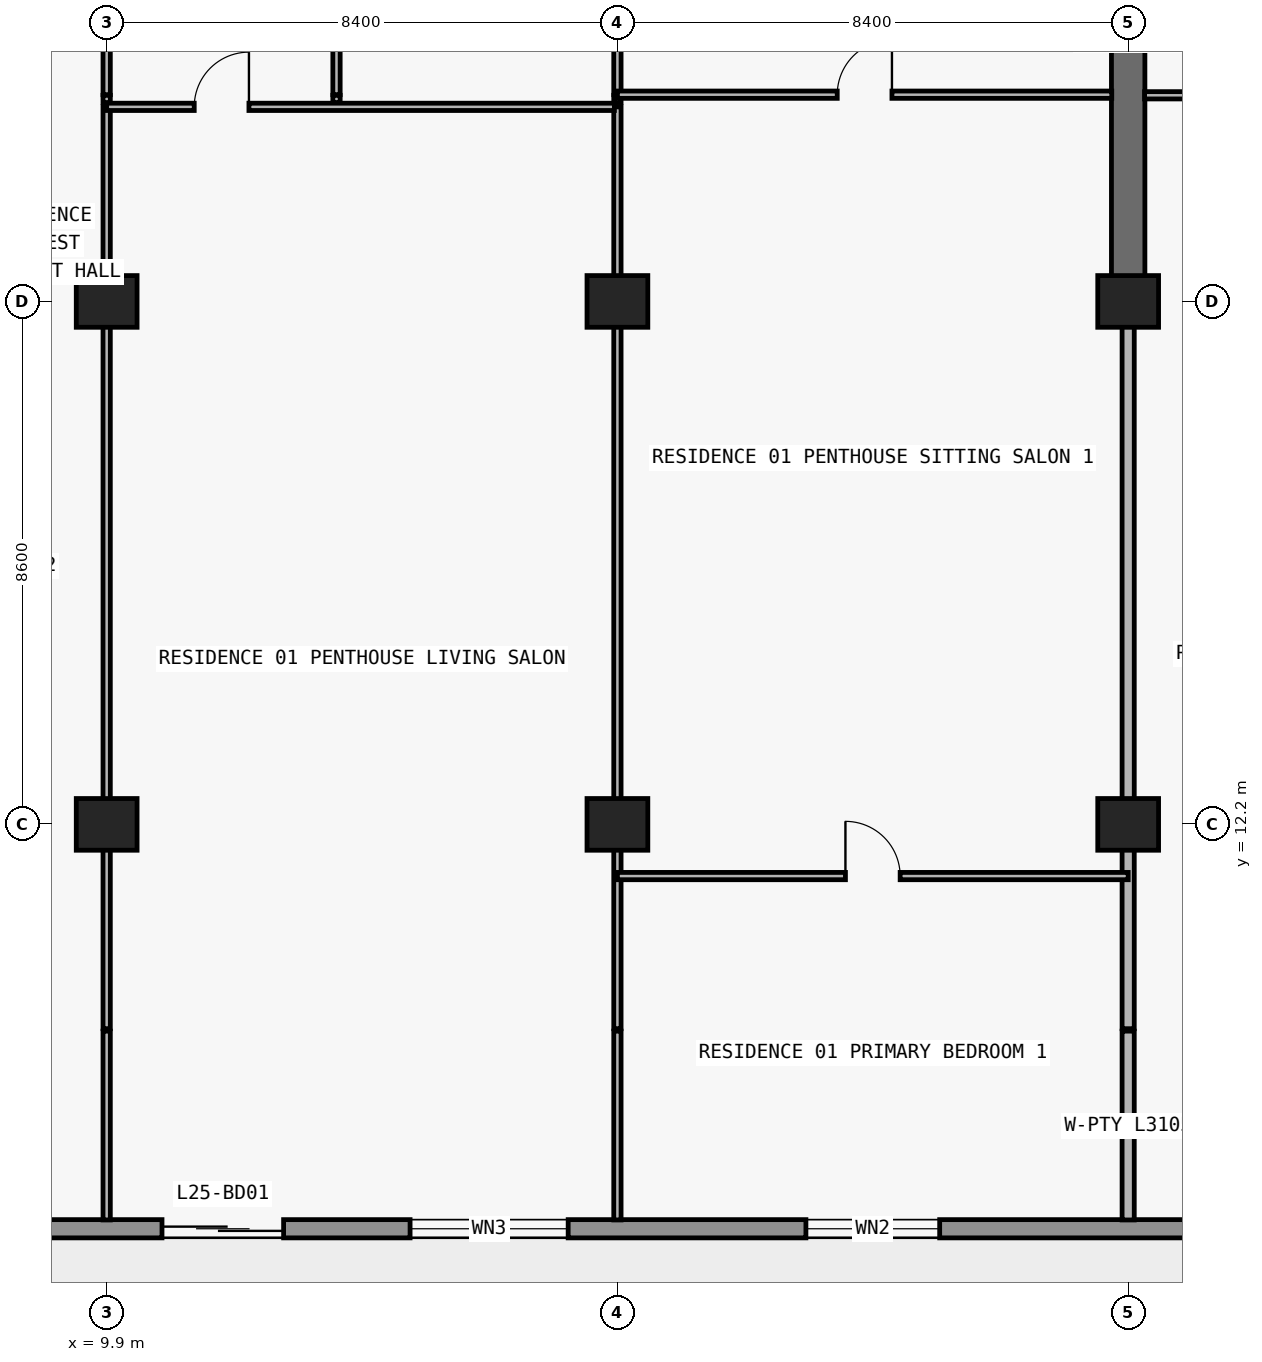
"""IFC4 building model, lengths in metres.
Left out: names, types, materials, properties, quantities, classifications, styles, units other than length and angle.
Written with IfcOpenShell. Run it as: python <this file> out.ifc"""

import sys

from ifc_helpers import new_model, si_unit, direction, frame, frame_2d, origin, origin_2d, place, context, subcontext, project, spatial, rectangle, extrude, element, fill, save


model = new_model("IFC4")
c1 = context("Model", 3, precision=1e-05, world=origin(), true_north=direction((0.0, 1.0)))
c2 = subcontext(c1, "Body", "Model", "MODEL_VIEW")
j1 = project(units=[si_unit("LENGTHUNIT", "METRE"), si_unit("PLANEANGLEUNIT", "RADIAN")], contexts=[c1])
p1 = place(None, origin())
s1 = spatial("IfcSite", under=j1, at=p1, CompositionType="ELEMENT")
p2 = place(p1, origin())
s2 = spatial("IfcBuilding", under=s1, at=p2, CompositionType="ELEMENT")
p3 = place(p2, frame((0.0, 0.0, 94.5)))
s3 = spatial("IfcBuildingStorey", under=s2, at=p3, CompositionType="ELEMENT", Elevation=94.5)
for number, where, z_axis, x_axis in (
    (1, (9.9, 12.2, 0.0), (0.0, 0.0, 1.0), (1.0, 0.0, 0.0)),
    (2, (18.3, 12.2, 0.0), (0.0, 0.0, 1.0), (1.0, 0.0, 0.0)),
    (3, (26.7, 12.2, 0.0), (0.0, 0.0, 1.0), (1.0, 0.0, 0.0)),
    (4, (9.9, 20.8, 0.0), (0.0, 0.0, 1.0), (1.0, 0.0, 0.0)),
    (5, (18.3, 20.8, 0.0), (0.0, 0.0, 1.0), (1.0, 0.0, 0.0)),
    (6, (26.7, 20.8, 0.0), (0.0, 0.0, 1.0), (1.0, 0.0, 0.0)),
):
    element("IfcColumn", number, at=place(p3, frame(where, z_axis=z_axis, x_axis=x_axis)), inside=s3, PredefinedType="COLUMN", context=c2, shape_type="SweptSolid", body=[
        extrude(rectangle(XDim=1.0, YDim=0.85, at=origin_2d()), origin(), (0.0, 0.0, 1.0), 3.0),
    ])
p4 = place(p3, frame((26.7, 20.8, 0.0), z_axis=(0.0, 0.0, 1.0), x_axis=(0.0, 1.0, 0.0)))
e7 = element("IfcWall", 7, at=p4, inside=s3, PredefinedType="SHEAR", context=c2, shape_type="SweptSolid", body=[
    extrude(rectangle(XDim=8.6, YDim=0.55, at=frame_2d((4.3, 0.0))), origin(), (0.0, 0.0, 1.0), 3.0),
])
p5 = place(p3, frame((70.1, 5.55, 0.0), z_axis=(0.0, 0.0, 1.0), x_axis=(-1.0, 0.0, 0.0)))
e8 = element("IfcWall", 8, at=p5, inside=s3, PredefinedType="STANDARD", context=c2, shape_type="SweptSolid", body=[
    extrude(rectangle(XDim=62.4, YDim=0.3, at=frame_2d((31.2, 0.0))), origin(), (0.0, 0.0, 1.0), 3.0),
])
p6 = place(p5, frame((57.29, 0.0, 0.0)))
e9 = element("IfcOpeningElement", 9, at=p6, cuts=e8, PredefinedType="OPENING", context=c2, shape_type="SweptSolid", body=[
    extrude(rectangle(XDim=2.0, YDim=2.3, at=frame_2d((1.0, 1.15))), frame((0.0, 0.16, 0.0), z_axis=(0.0, -1.0, 0.0), x_axis=(1.0, 0.0, 0.0)), (0.0, 0.0, 1.0), 0.32),
])
p7 = place(p5, frame((52.61, 0.0, 0.65)))
e10 = element("IfcOpeningElement", 10, at=p7, cuts=e8, PredefinedType="OPENING", context=c2, shape_type="SweptSolid", body=[
    extrude(rectangle(XDim=2.6, YDim=1.85, at=frame_2d((1.3, 0.925))), frame((0.0, 0.16, 0.0), z_axis=(0.0, -1.0, 0.0), x_axis=(1.0, 0.0, 0.0)), (0.0, 0.0, 1.0), 0.32),
])
p8 = place(p5, frame((46.5, 0.0, 0.85)))
e11 = element("IfcOpeningElement", 11, at=p8, cuts=e8, PredefinedType="OPENING", context=c2, shape_type="SweptSolid", body=[
    extrude(rectangle(XDim=2.2, YDim=1.55, at=frame_2d((1.1, 0.775))), frame((0.0, 0.16, 0.0), z_axis=(0.0, -1.0, 0.0), x_axis=(1.0, 0.0, 0.0)), (0.0, 0.0, 1.0), 0.32),
])
p9 = place(p5, frame((40.09, 0.0, 0.0)))
e12 = element("IfcOpeningElement", 12, at=p9, cuts=e8, PredefinedType="OPENING", context=c2, shape_type="SweptSolid", body=[
    extrude(rectangle(XDim=2.0, YDim=2.3, at=frame_2d((1.0, 1.15))), frame((0.0, 0.16, 0.0), z_axis=(0.0, -1.0, 0.0), x_axis=(1.0, 0.0, 0.0)), (0.0, 0.0, 1.0), 0.32),
])
p10 = place(p5, frame((35.99, 0.0, 0.85)))
e13 = element("IfcOpeningElement", 13, at=p10, cuts=e8, PredefinedType="OPENING", context=c2, shape_type="SweptSolid", body=[
    extrude(rectangle(XDim=1.8, YDim=1.55, at=frame_2d((0.9, 0.775))), frame((0.0, 0.16, 0.0), z_axis=(0.0, -1.0, 0.0), x_axis=(1.0, 0.0, 0.0)), (0.0, 0.0, 1.0), 0.32),
])
p11 = place(p5, frame((28.314, 0.0, 0.85)))
e14 = element("IfcOpeningElement", 14, at=p11, cuts=e8, PredefinedType="OPENING", context=c2, shape_type="SweptSolid", body=[
    extrude(rectangle(XDim=2.2, YDim=1.55, at=frame_2d((1.1, 0.775))), frame((0.0, 0.16, 0.0), z_axis=(0.0, -1.0, 0.0), x_axis=(1.0, 0.0, 0.0)), (0.0, 0.0, 1.0), 0.32),
])
p12 = place(p5, frame((24.09, 0.0, 0.0)))
e15 = element("IfcOpeningElement", 15, at=p12, cuts=e8, PredefinedType="OPENING", context=c2, shape_type="SweptSolid", body=[
    extrude(rectangle(XDim=2.0, YDim=2.3, at=frame_2d((1.0, 1.15))), frame((0.0, 0.16, 0.0), z_axis=(0.0, -1.0, 0.0), x_axis=(1.0, 0.0, 0.0)), (0.0, 0.0, 1.0), 0.32),
])
p13 = place(p5, frame((19.99, 0.0, 0.85)))
e16 = element("IfcOpeningElement", 16, at=p13, cuts=e8, PredefinedType="OPENING", context=c2, shape_type="SweptSolid", body=[
    extrude(rectangle(XDim=1.8, YDim=1.55, at=frame_2d((0.9, 0.775))), frame((0.0, 0.16, 0.0), z_axis=(0.0, -1.0, 0.0), x_axis=(1.0, 0.0, 0.0)), (0.0, 0.0, 1.0), 0.32),
])
p14 = place(p5, frame((16.09, 0.0, 0.0)))
e17 = element("IfcOpeningElement", 17, at=p14, cuts=e8, PredefinedType="OPENING", context=c2, shape_type="SweptSolid", body=[
    extrude(rectangle(XDim=2.0, YDim=2.3, at=frame_2d((1.0, 1.15))), frame((0.0, 0.16, 0.0), z_axis=(0.0, -1.0, 0.0), x_axis=(1.0, 0.0, 0.0)), (0.0, 0.0, 1.0), 0.32),
])
p15 = place(p5, frame((11.41, 0.0, 0.65)))
e18 = element("IfcOpeningElement", 18, at=p15, cuts=e8, PredefinedType="OPENING", context=c2, shape_type="SweptSolid", body=[
    extrude(rectangle(XDim=2.6, YDim=1.85, at=frame_2d((1.3, 0.925))), frame((0.0, 0.16, 0.0), z_axis=(0.0, -1.0, 0.0), x_axis=(1.0, 0.0, 0.0)), (0.0, 0.0, 1.0), 0.32),
])
p16 = place(p5, frame((5.3, 0.0, 0.85)))
e19 = element("IfcOpeningElement", 19, at=p16, cuts=e8, PredefinedType="OPENING", context=c2, shape_type="SweptSolid", body=[
    extrude(rectangle(XDim=2.2, YDim=1.55, at=frame_2d((1.1, 0.775))), frame((0.0, 0.16, 0.0), z_axis=(0.0, -1.0, 0.0), x_axis=(1.0, 0.0, 0.0)), (0.0, 0.0, 1.0), 0.32),
])
p17 = place(p3, frame((9.9, 5.695, 0.0), z_axis=(0.0, 0.0, 1.0), x_axis=(0.0, 1.0, 0.0)))
e20 = element("IfcWall", 20, at=p17, inside=s3, PredefinedType="PARTITIONING", context=c2, shape_type="SweptSolid", body=[
    extrude(rectangle(XDim=3.105, YDim=0.12, at=frame_2d((1.552, 0.0))), origin(), (0.0, 0.0, 1.0), 3.0),
])
p18 = place(p3, frame((9.9, 8.84, 0.0), z_axis=(0.0, 0.0, 1.0), x_axis=(0.0, 1.0, 0.0)))
e21 = element("IfcWall", 21, at=p18, inside=s3, PredefinedType="PARTITIONING", context=c2, shape_type="SweptSolid", body=[
    extrude(rectangle(XDim=15.16, YDim=0.12, at=frame_2d((7.58, 0.0))), origin(), (0.0, 0.0, 1.0), 2.124),
])
p19 = place(p3, frame((9.9, 24.07, 0.0), z_axis=(0.0, 0.0, 1.0), x_axis=(0.0, 1.0, 0.0)))
e22 = element("IfcWall", 22, at=p19, inside=s3, PredefinedType="PARTITIONING", context=c2, shape_type="SweptSolid", body=[
    extrude(rectangle(XDim=0.12, YDim=0.12, at=frame_2d((0.06, 0.0))), origin(), (0.0, 0.0, 1.0), 2.124),
])
p20 = place(p3, frame((9.9, 24.2, 0.0), z_axis=(0.0, 0.0, 1.0), x_axis=(0.0, 1.0, 0.0)))
e23 = element("IfcWall", 23, at=p20, inside=s3, PredefinedType="PARTITIONING", context=c2, shape_type="SweptSolid", body=[
    extrude(rectangle(XDim=5.14, YDim=0.12, at=frame_2d((2.57, 0.0))), origin(), (0.0, 0.0, 1.0), 2.124),
])
p21 = place(p20, frame((1.85, 0.0, 0.0)))
e24 = element("IfcOpeningElement", 24, at=p21, cuts=e23, PredefinedType="OPENING", context=c2, shape_type="SweptSolid", body=[
    extrude(rectangle(XDim=0.9, YDim=2.074, at=frame_2d((0.45, 1.037))), frame((0.0, 0.07, 0.0), z_axis=(0.0, -1.0, 0.0), x_axis=(1.0, 0.0, 0.0)), (0.0, 0.0, 1.0), 0.14),
])
p22 = place(p3, frame((13.68, 24.07, 0.0), z_axis=(0.0, 0.0, 1.0), x_axis=(0.0, 1.0, 0.0)))
e25 = element("IfcWall", 25, at=p22, inside=s3, PredefinedType="PARTITIONING", context=c2, shape_type="SweptSolid", body=[
    extrude(rectangle(XDim=0.12, YDim=0.12, at=frame_2d((0.06, 0.0))), origin(), (0.0, 0.0, 1.0), 3.0),
])
p23 = place(p3, frame((13.68, 24.2, 0.0), z_axis=(0.0, 0.0, 1.0), x_axis=(0.0, 1.0, 0.0)))
e26 = element("IfcWall", 26, at=p23, inside=s3, PredefinedType="PARTITIONING", context=c2, shape_type="SweptSolid", body=[
    extrude(rectangle(XDim=4.6, YDim=0.12, at=frame_2d((2.3, 0.0))), origin(), (0.0, 0.0, 1.0), 3.0),
])
p24 = place(p23, frame((1.85, 0.0, 0.0)))
e27 = element("IfcOpeningElement", 27, at=p24, cuts=e26, PredefinedType="OPENING", context=c2, shape_type="SweptSolid", body=[
    extrude(rectangle(XDim=0.9, YDim=2.15, at=frame_2d((0.45, 1.075))), frame((0.0, 0.07, 0.0), z_axis=(0.0, -1.0, 0.0), x_axis=(1.0, 0.0, 0.0)), (0.0, 0.0, 1.0), 0.14),
])
p25 = place(p3, frame((18.3, 5.695, 0.0), z_axis=(0.0, 0.0, 1.0), x_axis=(0.0, 1.0, 0.0)))
e28 = element("IfcWall", 28, at=p25, inside=s3, PredefinedType="PARTITIONING", context=c2, shape_type="SweptSolid", body=[
    extrude(rectangle(XDim=3.105, YDim=0.12, at=frame_2d((1.552, 0.0))), origin(), (0.0, 0.0, 1.0), 3.0),
])
p26 = place(p3, frame((18.3, 8.84, 0.0), z_axis=(0.0, 0.0, 1.0), x_axis=(0.0, 1.0, 0.0)))
e29 = element("IfcWall", 29, at=p26, inside=s3, PredefinedType="PARTITIONING", context=c2, shape_type="SweptSolid", body=[
    extrude(rectangle(XDim=15.16, YDim=0.12, at=frame_2d((7.58, 0.0))), origin(), (0.0, 0.0, 1.0), 2.124),
])
p27 = place(p3, frame((18.3, 24.07, 0.0), z_axis=(0.0, 0.0, 1.0), x_axis=(0.0, 1.0, 0.0)))
e30 = element("IfcWall", 30, at=p27, inside=s3, PredefinedType="PARTITIONING", context=c2, shape_type="SweptSolid", body=[
    extrude(rectangle(XDim=0.12, YDim=0.12, at=frame_2d((0.06, 0.0))), origin(), (0.0, 0.0, 1.0), 2.124),
])
p28 = place(p3, frame((18.3, 24.2, 0.0), z_axis=(0.0, 0.0, 1.0), x_axis=(0.0, 1.0, 0.0)))
e31 = element("IfcWall", 31, at=p28, inside=s3, PredefinedType="PARTITIONING", context=c2, shape_type="SweptSolid", body=[
    extrude(rectangle(XDim=5.14, YDim=0.12, at=frame_2d((2.57, 0.0))), origin(), (0.0, 0.0, 1.0), 2.124),
])
p29 = place(p28, frame((1.75, 0.0, 0.0)))
e32 = element("IfcOpeningElement", 32, at=p29, cuts=e31, PredefinedType="OPENING", context=c2, shape_type="SweptSolid", body=[
    extrude(rectangle(XDim=0.9, YDim=2.074, at=frame_2d((0.45, 1.037))), frame((0.0, 0.07, 0.0), z_axis=(0.0, -1.0, 0.0), x_axis=(1.0, 0.0, 0.0)), (0.0, 0.0, 1.0), 0.14),
])
p30 = place(p3, frame((26.7, 5.695, 0.0), z_axis=(0.0, 0.0, 1.0), x_axis=(0.0, 1.0, 0.0)))
e33 = element("IfcWall", 33, at=p30, inside=s3, PredefinedType="PARTITIONING", context=c2, shape_type="SweptSolid", body=[
    extrude(rectangle(XDim=3.105, YDim=0.2, at=frame_2d((1.552, 0.0))), origin(), (0.0, 0.0, 1.0), 3.0),
])
p31 = place(p3, frame((26.7, 8.84, 0.0), z_axis=(0.0, 0.0, 1.0), x_axis=(0.0, 1.0, 0.0)))
e34 = element("IfcWall", 34, at=p31, inside=s3, PredefinedType="PARTITIONING", context=c2, shape_type="SweptSolid", body=[
    extrude(rectangle(XDim=11.955, YDim=0.2, at=frame_2d((5.978, 0.0))), origin(), (0.0, 0.0, 1.0), 2.124),
])
p32 = place(p3, frame((18.3, 11.35, 0.0), z_axis=(0.0, 0.0, 1.0), x_axis=(1.0, 0.0, 0.0)))
e35 = element("IfcWall", 35, at=p32, inside=s3, PredefinedType="PARTITIONING", context=c2, shape_type="SweptSolid", body=[
    extrude(rectangle(XDim=8.4, YDim=0.12, at=frame_2d((4.2, 0.0))), origin(), (0.0, 0.0, 1.0), 3.0),
])
p33 = place(p32, frame((3.75, 0.0, 0.0)))
e36 = element("IfcOpeningElement", 36, at=p33, cuts=e35, PredefinedType="OPENING", context=c2, shape_type="SweptSolid", body=[
    extrude(rectangle(XDim=0.9, YDim=2.15, at=frame_2d((0.45, 1.075))), frame((0.0, 0.07, 0.0), z_axis=(0.0, -1.0, 0.0), x_axis=(1.0, 0.0, 0.0)), (0.0, 0.0, 1.0), 0.14),
])
p34 = place(p3, frame((9.9, 24.0, 0.0), z_axis=(0.0, 0.0, 1.0), x_axis=(1.0, 0.0, 0.0)))
e37 = element("IfcWall", 37, at=p34, inside=s3, PredefinedType="PARTITIONING", context=c2, shape_type="SweptSolid", body=[
    extrude(rectangle(XDim=8.35, YDim=0.12, at=frame_2d((4.175, 0.0))), origin(), (0.0, 0.0, 1.0), 3.0),
])
p35 = place(p34, frame((1.44, 0.0, 0.0)))
e38 = element("IfcOpeningElement", 38, at=p35, cuts=e37, PredefinedType="OPENING", context=c2, shape_type="SweptSolid", body=[
    extrude(rectangle(XDim=0.9, YDim=2.15, at=frame_2d((0.45, 1.075))), frame((0.0, 0.07, 0.0), z_axis=(0.0, -1.0, 0.0), x_axis=(1.0, 0.0, 0.0)), (0.0, 0.0, 1.0), 0.14),
])
p36 = place(p3, frame((26.97, 24.19, 0.0), z_axis=(0.0, 0.0, 1.0), x_axis=(1.0, 0.0, 0.0)))
e39 = element("IfcWall", 39, at=p36, inside=s3, PredefinedType="PARTITIONING", context=c2, shape_type="SweptSolid", body=[
    extrude(rectangle(XDim=8.13, YDim=0.12, at=frame_2d((4.065, 0.0))), origin(), (0.0, 0.0, 1.0), 3.0),
])
p37 = place(p36, frame((1.558, 0.0, 0.0)))
e40 = element("IfcOpeningElement", 40, at=p37, cuts=e39, PredefinedType="OPENING", context=c2, shape_type="SweptSolid", body=[
    extrude(rectangle(XDim=0.9, YDim=2.15, at=frame_2d((0.45, 1.075))), frame((0.0, 0.07, 0.0), z_axis=(0.0, -1.0, 0.0), x_axis=(1.0, 0.0, 0.0)), (0.0, 0.0, 1.0), 0.14),
])
p38 = place(p36, frame((5.79, 0.0, 0.0)))
e41 = element("IfcOpeningElement", 41, at=p38, cuts=e39, PredefinedType="OPENING", context=c2, shape_type="SweptSolid", body=[
    extrude(rectangle(XDim=0.9, YDim=2.15, at=frame_2d((0.45, 1.075))), frame((0.0, 0.07, 0.0), z_axis=(0.0, -1.0, 0.0), x_axis=(1.0, 0.0, 0.0)), (0.0, 0.0, 1.0), 0.14),
])
p39 = place(p3, frame((18.3, 24.2, 0.0), z_axis=(0.0, 0.0, 1.0), x_axis=(1.0, 0.0, 0.0)))
e42 = element("IfcWall", 42, at=p39, inside=s3, PredefinedType="PARTITIONING", context=c2, shape_type="SweptSolid", body=[
    extrude(rectangle(XDim=8.13, YDim=0.12, at=frame_2d((4.065, 0.0))), origin(), (0.0, 0.0, 1.0), 3.0),
])
p40 = place(p39, frame((3.615, 0.0, 0.0)))
e43 = element("IfcOpeningElement", 43, at=p40, cuts=e42, PredefinedType="OPENING", context=c2, shape_type="SweptSolid", body=[
    extrude(rectangle(XDim=0.9, YDim=2.15, at=frame_2d((0.45, 1.075))), frame((0.0, 0.07, 0.0), z_axis=(0.0, -1.0, 0.0), x_axis=(1.0, 0.0, 0.0)), (0.0, 0.0, 1.0), 0.14),
])
p41 = place(p6, origin())
e44 = element("IfcDoor", 44, at=p41, inside=s3, OperationType="DOUBLE_DOOR_SLIDING", PredefinedType="DOOR", context=c2, shape_type="SweptSolid", body=[
    extrude(rectangle(XDim=2.0, YDim=2.3, at=frame_2d((1.0, 1.15))), frame((0.0, 0.025, 0.0), z_axis=(0.0, -1.0, 0.0), x_axis=(1.0, 0.0, 0.0)), (0.0, 0.0, 1.0), 0.05),
])
fill(e9, e44)
p42 = place(p7, origin())
e45 = element("IfcWindow", 45, at=p42, inside=s3, PartitioningType="SINGLE_PANEL", PredefinedType="WINDOW", context=c2, shape_type="SweptSolid", body=[
    extrude(rectangle(XDim=2.6, YDim=1.85, at=frame_2d((1.3, 0.925))), frame((0.0, 0.03, 0.0), z_axis=(0.0, -1.0, 0.0), x_axis=(1.0, 0.0, 0.0)), (0.0, 0.0, 1.0), 0.06),
])
fill(e10, e45)
p43 = place(p8, origin())
e46 = element("IfcWindow", 46, at=p43, inside=s3, PartitioningType="SINGLE_PANEL", PredefinedType="WINDOW", context=c2, shape_type="SweptSolid", body=[
    extrude(rectangle(XDim=2.2, YDim=1.55, at=frame_2d((1.1, 0.775))), frame((0.0, 0.03, 0.0), z_axis=(0.0, -1.0, 0.0), x_axis=(1.0, 0.0, 0.0)), (0.0, 0.0, 1.0), 0.06),
])
fill(e11, e46)
p44 = place(p35, origin())
e47 = element("IfcDoor", 47, at=p44, inside=s3, OperationType="SINGLE_SWING_RIGHT", PredefinedType="DOOR", context=c2, shape_type="SweptSolid", body=[
    extrude(rectangle(XDim=0.9, YDim=2.15, at=frame_2d((0.45, 1.075))), frame((0.0, 0.025, 0.0), z_axis=(0.0, -1.0, 0.0), x_axis=(1.0, 0.0, 0.0)), (0.0, 0.0, 1.0), 0.05),
])
fill(e38, e47)
p45 = place(p40, origin())
e48 = element("IfcDoor", 48, at=p45, inside=s3, OperationType="SINGLE_SWING_RIGHT", PredefinedType="DOOR", context=c2, shape_type="SweptSolid", body=[
    extrude(rectangle(XDim=0.9, YDim=2.15, at=frame_2d((0.45, 1.075))), frame((0.0, 0.025, 0.0), z_axis=(0.0, -1.0, 0.0), x_axis=(1.0, 0.0, 0.0)), (0.0, 0.0, 1.0), 0.05),
])
fill(e43, e48)
p46 = place(p33, origin())
e49 = element("IfcDoor", 49, at=p46, inside=s3, OperationType="SINGLE_SWING_LEFT", PredefinedType="DOOR", context=c2, shape_type="SweptSolid", body=[
    extrude(rectangle(XDim=0.9, YDim=2.15, at=frame_2d((0.45, 1.075))), frame((0.0, 0.025, 0.0), z_axis=(0.0, -1.0, 0.0), x_axis=(1.0, 0.0, 0.0)), (0.0, 0.0, 1.0), 0.05),
])
fill(e36, e49)
save(model, sys.argv[1])
